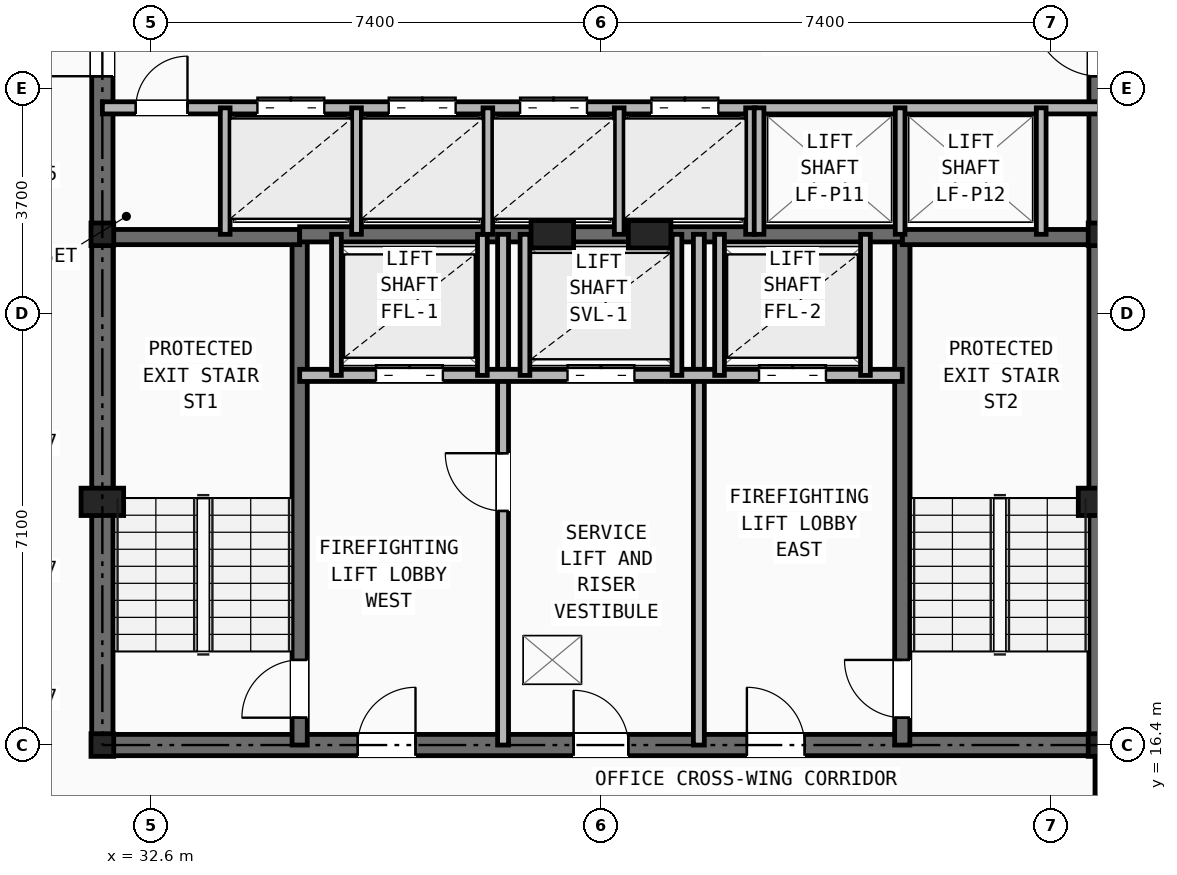
"""IFC4 building model, lengths in metres.
Left out: names, types, materials, properties, quantities, classifications, styles, units other than length and angle.
Written with IfcOpenShell. Run it as: python <this file> out.ifc"""

import sys

from ifc_helpers import new_model, si_unit, direction, frame, frame_2d, origin, origin_2d, place, context, subcontext, project, spatial, rectangle, i_section, extrude, element, fill, save


model = new_model("IFC4")
c1 = context("Model", 3, precision=1e-05, world=origin(), true_north=direction((0.0, 1.0)))
c2 = subcontext(c1, "Body", "Model", "MODEL_VIEW")
j1 = project(units=[si_unit("LENGTHUNIT", "METRE"), si_unit("PLANEANGLEUNIT", "RADIAN")], contexts=[c1])
p1 = place(None, origin())
s1 = spatial("IfcSite", under=j1, at=p1, CompositionType="ELEMENT")
p2 = place(p1, origin())
s2 = spatial("IfcBuilding", under=s1, at=p2, CompositionType="ELEMENT")
p3 = place(p2, frame((0.0, 0.0, 182.7)))
s3 = spatial("IfcBuildingStorey", under=s2, at=p3, CompositionType="ELEMENT", Elevation=182.7)
for number, where, z_axis, x_axis in (
    (1, (31.8, 16.4, 0.0), (0.0, 0.0, 1.0), (1.0, 0.0, 0.0)),
    (2, (48.2, 16.4, 0.0), (0.0, 0.0, 1.0), (1.0, 0.0, 0.0)),
    (3, (31.8, 24.8, 0.0), (0.0, 0.0, 1.0), (1.0, 0.0, 0.0)),
    (4, (48.2, 24.8, 0.0), (0.0, 0.0, 1.0), (1.0, 0.0, 0.0)),
):
    element("IfcColumn", number, at=place(p3, frame(where, z_axis=z_axis, x_axis=x_axis)), inside=s3, PredefinedType="COLUMN", context=c2, shape_type="SweptSolid", body=[
        extrude(i_section(OverallWidth=0.374, OverallDepth=0.372, WebThickness=0.016, FlangeThickness=0.026, at=origin_2d()), origin(), (0.0, 0.0, 1.0), 3.45),
    ])
for number, where, z_axis, x_axis in (
    (5, (31.8, 20.4, 0.0), (0.0, 0.0, 1.0), (1.0, 0.0, 0.0)),
    (6, (48.2, 20.4, 0.0), (0.0, 0.0, 1.0), (1.0, 0.0, 0.0)),
    (7, (39.2, 24.8, 0.0), (0.0, 0.0, 1.0), (1.0, 0.0, 0.0)),
    (8, (40.8, 24.8, 0.0), (0.0, 0.0, 1.0), (1.0, 0.0, 0.0)),
):
    element("IfcColumn", number, at=place(p3, frame(where, z_axis=z_axis, x_axis=x_axis)), inside=s3, PredefinedType="PILASTER", context=c2, shape_type="SweptSolid", body=[
        extrude(rectangle(XDim=0.7, YDim=0.45, at=origin_2d()), origin(), (0.0, 0.0, 1.0), 3.45),
    ])
p4 = place(p3, frame((31.8, 16.4, 0.0), z_axis=(0.0, 0.0, 1.0), x_axis=(1.0, 0.0, 0.0)))
e9 = element("IfcWall", 9, at=p4, inside=s3, PredefinedType="SHEAR", context=c2, shape_type="SweptSolid", body=[
    extrude(rectangle(XDim=16.4, YDim=0.35, at=frame_2d((8.2, 0.0))), origin(), (0.0, 0.0, 1.0), 3.21),
])
p5 = place(p4, frame((7.75, 0.0, 0.0)))
e10 = element("IfcOpeningElement", 10, at=p5, cuts=e9, PredefinedType="OPENING", context=c2, shape_type="SweptSolid", body=[
    extrude(rectangle(XDim=0.9, YDim=2.1, at=frame_2d((0.45, 1.05))), frame((0.0, 0.185, 0.0), z_axis=(0.0, -1.0, 0.0), x_axis=(1.0, 0.0, 0.0)), (0.0, 0.0, 1.0), 0.37),
])
p6 = place(p4, frame((4.2, 0.0, 0.0)))
e11 = element("IfcOpeningElement", 11, at=p6, cuts=e9, PredefinedType="OPENING", context=c2, shape_type="SweptSolid", body=[
    extrude(rectangle(XDim=0.95, YDim=2.1, at=frame_2d((0.475, 1.05))), frame((0.0, 0.185, 0.0), z_axis=(0.0, -1.0, 0.0), x_axis=(1.0, 0.0, 0.0)), (0.0, 0.0, 1.0), 0.37),
])
p7 = place(p4, frame((10.6, 0.0, 0.0)))
e12 = element("IfcOpeningElement", 12, at=p7, cuts=e9, PredefinedType="OPENING", context=c2, shape_type="SweptSolid", body=[
    extrude(rectangle(XDim=0.95, YDim=2.1, at=frame_2d((0.475, 1.05))), frame((0.0, 0.185, 0.0), z_axis=(0.0, -1.0, 0.0), x_axis=(1.0, 0.0, 0.0)), (0.0, 0.0, 1.0), 0.37),
])
p8 = place(p3, frame((31.8, 16.4, 0.0), z_axis=(0.0, 0.0, 1.0), x_axis=(0.0, 1.0, 0.0)))
e13 = element("IfcWall", 13, at=p8, inside=s3, PredefinedType="SHEAR", context=c2, shape_type="SweptSolid", body=[
    extrude(rectangle(XDim=14.8, YDim=0.35, at=frame_2d((7.4, 0.0))), origin(), (0.0, 0.0, 1.0), 3.21),
])
p9 = place(p8, frame((11.0, 0.0, 0.0)))
e14 = element("IfcOpeningElement", 14, at=p9, cuts=e13, PredefinedType="OPENING", context=c2, shape_type="SweptSolid", body=[
    extrude(rectangle(XDim=1.1, YDim=2.15, at=frame_2d((0.55, 1.075))), frame((0.0, 0.185, 0.0), z_axis=(0.0, -1.0, 0.0), x_axis=(1.0, 0.0, 0.0)), (0.0, 0.0, 1.0), 0.37),
])
p10 = place(p3, frame((48.2, 16.4, 0.0), z_axis=(0.0, 0.0, 1.0), x_axis=(0.0, 1.0, 0.0)))
e15 = element("IfcWall", 15, at=p10, inside=s3, PredefinedType="SHEAR", context=c2, shape_type="SweptSolid", body=[
    extrude(rectangle(XDim=14.8, YDim=0.35, at=frame_2d((7.4, 0.0))), origin(), (0.0, 0.0, 1.0), 3.21),
])
p11 = place(p10, frame((11.0, 0.0, 0.0)))
e16 = element("IfcOpeningElement", 16, at=p11, cuts=e15, PredefinedType="OPENING", context=c2, shape_type="SweptSolid", body=[
    extrude(rectangle(XDim=1.1, YDim=2.15, at=frame_2d((0.55, 1.075))), frame((0.0, 0.185, 0.0), z_axis=(0.0, -1.0, 0.0), x_axis=(1.0, 0.0, 0.0)), (0.0, 0.0, 1.0), 0.37),
])
p12 = place(p3, frame((35.045, 16.4, 0.0), z_axis=(0.0, 0.0, 1.0), x_axis=(0.0, 1.0, 0.0)))
e17 = element("IfcWall", 17, at=p12, inside=s3, PredefinedType="SHEAR", context=c2, shape_type="SweptSolid", body=[
    extrude(rectangle(XDim=8.4, YDim=0.25, at=frame_2d((4.2, 0.0))), origin(), (0.0, 0.0, 1.0), 3.21),
])
p13 = place(p12, frame((0.45, 0.0, 0.0)))
e18 = element("IfcOpeningElement", 18, at=p13, cuts=e17, PredefinedType="OPENING", context=c2, shape_type="SweptSolid", body=[
    extrude(rectangle(XDim=0.95, YDim=2.1, at=frame_2d((0.475, 1.05))), frame((0.0, 0.135, 0.0), z_axis=(0.0, -1.0, 0.0), x_axis=(1.0, 0.0, 0.0)), (0.0, 0.0, 1.0), 0.27),
])
p14 = place(p3, frame((31.8, 24.755, 0.0), z_axis=(0.0, 0.0, 1.0), x_axis=(1.0, 0.0, 0.0)))
e19 = element("IfcWall", 19, at=p14, inside=s3, PredefinedType="SHEAR", context=c2, shape_type="SweptSolid", body=[
    extrude(rectangle(XDim=3.245, YDim=0.25, at=frame_2d((1.623, 0.0))), origin(), (0.0, 0.0, 1.0), 3.21),
])
p15 = place(p3, frame((44.955, 16.4, 0.0), z_axis=(0.0, 0.0, 1.0), x_axis=(0.0, 1.0, 0.0)))
e20 = element("IfcWall", 20, at=p15, inside=s3, PredefinedType="SHEAR", context=c2, shape_type="SweptSolid", body=[
    extrude(rectangle(XDim=8.4, YDim=0.25, at=frame_2d((4.2, 0.0))), origin(), (0.0, 0.0, 1.0), 3.21),
])
p16 = place(p15, frame((0.45, 0.0, 0.0)))
e21 = element("IfcOpeningElement", 21, at=p16, cuts=e20, PredefinedType="OPENING", context=c2, shape_type="SweptSolid", body=[
    extrude(rectangle(XDim=0.95, YDim=2.1, at=frame_2d((0.475, 1.05))), frame((0.0, 0.135, 0.0), z_axis=(0.0, -1.0, 0.0), x_axis=(1.0, 0.0, 0.0)), (0.0, 0.0, 1.0), 0.27),
])
p17 = place(p3, frame((44.955, 24.755, 0.0), z_axis=(0.0, 0.0, 1.0), x_axis=(1.0, 0.0, 0.0)))
e22 = element("IfcWall", 22, at=p17, inside=s3, PredefinedType="SHEAR", context=c2, shape_type="SweptSolid", body=[
    extrude(rectangle(XDim=3.245, YDim=0.25, at=frame_2d((1.623, 0.0))), origin(), (0.0, 0.0, 1.0), 3.21),
])
p18 = place(p3, frame((35.045, 24.8, 0.0), z_axis=(0.0, 0.0, 1.0), x_axis=(1.0, 0.0, 0.0)))
e23 = element("IfcWall", 23, at=p18, inside=s3, PredefinedType="SHEAR", context=c2, shape_type="SweptSolid", body=[
    extrude(rectangle(XDim=9.91, YDim=0.25, at=frame_2d((4.955, 0.0))), origin(), (0.0, 0.0, 1.0), 3.21),
])
p19 = place(p3, frame((38.39, 16.4, 0.0), z_axis=(0.0, 0.0, 1.0), x_axis=(0.0, 1.0, 0.0)))
e24 = element("IfcWall", 24, at=p19, inside=s3, PredefinedType="PARTITIONING", context=c2, shape_type="SweptSolid", body=[
    extrude(rectangle(XDim=8.4, YDim=0.18, at=frame_2d((4.2, 0.0))), origin(), (0.0, 0.0, 1.0), 2.665),
])
p20 = place(p19, frame((3.85, 0.0, 0.0)))
e25 = element("IfcOpeningElement", 25, at=p20, cuts=e24, PredefinedType="OPENING", context=c2, shape_type="SweptSolid", body=[
    extrude(rectangle(XDim=0.95, YDim=2.1, at=frame_2d((0.475, 1.05))), frame((0.0, 0.1, 0.0), z_axis=(0.0, -1.0, 0.0), x_axis=(1.0, 0.0, 0.0)), (0.0, 0.0, 1.0), 0.2),
])
p21 = place(p3, frame((41.61, 16.4, 0.0), z_axis=(0.0, 0.0, 1.0), x_axis=(0.0, 1.0, 0.0)))
e26 = element("IfcWall", 26, at=p21, inside=s3, PredefinedType="PARTITIONING", context=c2, shape_type="SweptSolid", body=[
    extrude(rectangle(XDim=8.4, YDim=0.18, at=frame_2d((4.2, 0.0))), origin(), (0.0, 0.0, 1.0), 2.665),
])
p22 = place(p3, frame((35.045, 22.48, 0.0), z_axis=(0.0, 0.0, 1.0), x_axis=(1.0, 0.0, 0.0)))
e27 = element("IfcWall", 27, at=p22, inside=s3, PredefinedType="SOLIDWALL", context=c2, shape_type="SweptSolid", body=[
    extrude(rectangle(XDim=9.91, YDim=0.2, at=frame_2d((4.955, 0.0))), origin(), (0.0, 0.0, 1.0), 3.21),
])
p23 = place(p22, frame((1.255, 0.0, 0.0)))
e28 = element("IfcOpeningElement", 28, at=p23, cuts=e27, PredefinedType="OPENING", context=c2, shape_type="SweptSolid", body=[
    extrude(rectangle(XDim=1.1, YDim=2.15, at=frame_2d((0.55, 1.075))), frame((0.0, 0.11, 0.0), z_axis=(0.0, -1.0, 0.0), x_axis=(1.0, 0.0, 0.0)), (0.0, 0.0, 1.0), 0.22),
])
p24 = place(p22, frame((7.555, 0.0, 0.0)))
e29 = element("IfcOpeningElement", 29, at=p24, cuts=e27, PredefinedType="OPENING", context=c2, shape_type="SweptSolid", body=[
    extrude(rectangle(XDim=1.1, YDim=2.15, at=frame_2d((0.55, 1.075))), frame((0.0, 0.11, 0.0), z_axis=(0.0, -1.0, 0.0), x_axis=(1.0, 0.0, 0.0)), (0.0, 0.0, 1.0), 0.22),
])
p25 = place(p22, frame((4.405, 0.0, 0.0)))
e30 = element("IfcOpeningElement", 30, at=p25, cuts=e27, PredefinedType="OPENING", context=c2, shape_type="SweptSolid", body=[
    extrude(rectangle(XDim=1.1, YDim=2.15, at=frame_2d((0.55, 1.075))), frame((0.0, 0.11, 0.0), z_axis=(0.0, -1.0, 0.0), x_axis=(1.0, 0.0, 0.0)), (0.0, 0.0, 1.0), 0.22),
])
for number, where, z_axis, x_axis in (
    (31, (35.65, 22.48, 0.0), (0.0, 0.0, 1.0), (0.0, 1.0, 0.0)),
    (32, (38.05, 22.48, 0.0), (0.0, 0.0, 1.0), (0.0, 1.0, 0.0)),
    (33, (41.95, 22.48, 0.0), (0.0, 0.0, 1.0), (0.0, 1.0, 0.0)),
    (34, (44.35, 22.48, 0.0), (0.0, 0.0, 1.0), (0.0, 1.0, 0.0)),
    (35, (38.75, 22.48, 0.0), (0.0, 0.0, 1.0), (0.0, 1.0, 0.0)),
    (36, (41.25, 22.48, 0.0), (0.0, 0.0, 1.0), (0.0, 1.0, 0.0)),
):
    element("IfcWall", number, at=place(p3, frame(where, z_axis=z_axis, x_axis=x_axis)), inside=s3, PredefinedType="SOLIDWALL", context=c2, shape_type="SweptSolid", body=[
        extrude(rectangle(XDim=2.32, YDim=0.16, at=frame_2d((1.16, 0.0))), origin(), (0.0, 0.0, 1.0), 3.21),
    ])
p26 = place(p3, frame((31.8, 26.88, 0.0), z_axis=(0.0, 0.0, 1.0), x_axis=(1.0, 0.0, 0.0)))
e37 = element("IfcWall", 37, at=p26, inside=s3, PredefinedType="SOLIDWALL", context=c2, shape_type="SweptSolid", body=[
    extrude(rectangle(XDim=16.4, YDim=0.2, at=frame_2d((8.2, 0.0))), origin(), (0.0, 0.0, 1.0), 2.665),
])
p27 = place(p26, frame((0.55, 0.0, 0.0)))
e38 = element("IfcOpeningElement", 38, at=p27, cuts=e37, PredefinedType="OPENING", context=c2, shape_type="SweptSolid", body=[
    extrude(rectangle(XDim=0.85, YDim=2.05, at=frame_2d((0.425, 1.025))), frame((0.0, 0.11, 0.0), z_axis=(0.0, -1.0, 0.0), x_axis=(1.0, 0.0, 0.0)), (0.0, 0.0, 1.0), 0.22),
])
p28 = place(p26, frame((2.55, 0.0, 0.0)))
e39 = element("IfcOpeningElement", 39, at=p28, cuts=e37, PredefinedType="OPENING", context=c2, shape_type="SweptSolid", body=[
    extrude(rectangle(XDim=1.1, YDim=2.15, at=frame_2d((0.55, 1.075))), frame((0.0, 0.11, 0.0), z_axis=(0.0, -1.0, 0.0), x_axis=(1.0, 0.0, 0.0)), (0.0, 0.0, 1.0), 0.22),
])
p29 = place(p26, frame((4.71, 0.0, 0.0)))
e40 = element("IfcOpeningElement", 40, at=p29, cuts=e37, PredefinedType="OPENING", context=c2, shape_type="SweptSolid", body=[
    extrude(rectangle(XDim=1.1, YDim=2.15, at=frame_2d((0.55, 1.075))), frame((0.0, 0.11, 0.0), z_axis=(0.0, -1.0, 0.0), x_axis=(1.0, 0.0, 0.0)), (0.0, 0.0, 1.0), 0.22),
])
p30 = place(p26, frame((6.87, 0.0, 0.0)))
e41 = element("IfcOpeningElement", 41, at=p30, cuts=e37, PredefinedType="OPENING", context=c2, shape_type="SweptSolid", body=[
    extrude(rectangle(XDim=1.1, YDim=2.15, at=frame_2d((0.55, 1.075))), frame((0.0, 0.11, 0.0), z_axis=(0.0, -1.0, 0.0), x_axis=(1.0, 0.0, 0.0)), (0.0, 0.0, 1.0), 0.22),
])
p31 = place(p26, frame((9.03, 0.0, 0.0)))
e42 = element("IfcOpeningElement", 42, at=p31, cuts=e37, PredefinedType="OPENING", context=c2, shape_type="SweptSolid", body=[
    extrude(rectangle(XDim=1.1, YDim=2.15, at=frame_2d((0.55, 1.075))), frame((0.0, 0.11, 0.0), z_axis=(0.0, -1.0, 0.0), x_axis=(1.0, 0.0, 0.0)), (0.0, 0.0, 1.0), 0.22),
])
for number, where, z_axis, x_axis in (
    (43, (33.82, 24.8, 0.0), (0.0, 0.0, 1.0), (0.0, 1.0, 0.0)),
    (44, (35.98, 24.8, 0.0), (0.0, 0.0, 1.0), (0.0, 1.0, 0.0)),
    (45, (38.14, 24.8, 0.0), (0.0, 0.0, 1.0), (0.0, 1.0, 0.0)),
    (46, (40.3, 24.8, 0.0), (0.0, 0.0, 1.0), (0.0, 1.0, 0.0)),
    (47, (42.46, 24.8, 0.0), (0.0, 0.0, 1.0), (0.0, 1.0, 0.0)),
    (48, (42.6, 24.8, 0.0), (0.0, 0.0, 1.0), (0.0, 1.0, 0.0)),
    (49, (44.92, 24.8, 0.0), (0.0, 0.0, 1.0), (0.0, 1.0, 0.0)),
    (50, (47.24, 24.8, 0.0), (0.0, 0.0, 1.0), (0.0, 1.0, 0.0)),
):
    element("IfcWall", number, at=place(p3, frame(where, z_axis=z_axis, x_axis=x_axis)), inside=s3, PredefinedType="SOLIDWALL", context=c2, shape_type="SweptSolid", body=[
        extrude(rectangle(XDim=2.08, YDim=0.16, at=frame_2d((1.04, 0.0))), origin(), (0.0, 0.0, 1.0), 3.21),
    ])
p32 = place(p3, frame((48.2, 14.1, 0.0), z_axis=(0.0, 0.0, 1.0), x_axis=(0.0, 1.0, 0.0)))
e51 = element("IfcWall", 51, at=p32, inside=s3, PredefinedType="PARTITIONING", context=c2, shape_type="SweptSolid", body=[
    extrude(rectangle(XDim=2.3, YDim=0.15, at=frame_2d((1.15, 0.0))), origin(), (0.0, 0.0, 1.0), 2.665),
])
p33 = place(p5, origin())
e52 = element("IfcDoor", 52, at=p33, inside=s3, OperationType="SINGLE_SWING_LEFT", PredefinedType="DOOR", context=c2, shape_type="SweptSolid", body=[
    extrude(rectangle(XDim=0.9, YDim=2.1, at=frame_2d((0.45, 1.05))), frame((0.0, 0.025, 0.0), z_axis=(0.0, -1.0, 0.0), x_axis=(1.0, 0.0, 0.0)), (0.0, 0.0, 1.0), 0.05),
])
fill(e10, e52)
p34 = place(p20, origin())
e53 = element("IfcDoor", 53, at=p34, inside=s3, OperationType="SINGLE_SWING_RIGHT", PredefinedType="DOOR", context=c2, shape_type="SweptSolid", body=[
    extrude(rectangle(XDim=0.95, YDim=2.1, at=frame_2d((0.475, 1.05))), frame((0.0, 0.025, 0.0), z_axis=(0.0, -1.0, 0.0), x_axis=(1.0, 0.0, 0.0)), (0.0, 0.0, 1.0), 0.05),
])
fill(e25, e53)
p35 = place(p13, origin())
e54 = element("IfcDoor", 54, at=p35, inside=s3, OperationType="SINGLE_SWING_LEFT", PredefinedType="DOOR", context=c2, shape_type="SweptSolid", body=[
    extrude(rectangle(XDim=0.95, YDim=2.1, at=frame_2d((0.475, 1.05))), frame((0.0, 0.025, 0.0), z_axis=(0.0, -1.0, 0.0), x_axis=(1.0, 0.0, 0.0)), (0.0, 0.0, 1.0), 0.05),
])
fill(e18, e54)
p36 = place(p16, origin())
e55 = element("IfcDoor", 55, at=p36, inside=s3, OperationType="SINGLE_SWING_RIGHT", PredefinedType="DOOR", context=c2, shape_type="SweptSolid", body=[
    extrude(rectangle(XDim=0.95, YDim=2.1, at=frame_2d((0.475, 1.05))), frame((0.0, 0.025, 0.0), z_axis=(0.0, -1.0, 0.0), x_axis=(1.0, 0.0, 0.0)), (0.0, 0.0, 1.0), 0.05),
])
fill(e21, e55)
p37 = place(p6, origin())
e56 = element("IfcDoor", 56, at=p37, inside=s3, OperationType="SINGLE_SWING_RIGHT", PredefinedType="DOOR", context=c2, shape_type="SweptSolid", body=[
    extrude(rectangle(XDim=0.95, YDim=2.1, at=frame_2d((0.475, 1.05))), frame((0.0, 0.025, 0.0), z_axis=(0.0, -1.0, 0.0), x_axis=(1.0, 0.0, 0.0)), (0.0, 0.0, 1.0), 0.05),
])
fill(e11, e56)
p38 = place(p7, origin())
e57 = element("IfcDoor", 57, at=p38, inside=s3, OperationType="SINGLE_SWING_LEFT", PredefinedType="DOOR", context=c2, shape_type="SweptSolid", body=[
    extrude(rectangle(XDim=0.95, YDim=2.1, at=frame_2d((0.475, 1.05))), frame((0.0, 0.025, 0.0), z_axis=(0.0, -1.0, 0.0), x_axis=(1.0, 0.0, 0.0)), (0.0, 0.0, 1.0), 0.05),
])
fill(e12, e57)
p39 = place(p23, origin())
e58 = element("IfcDoor", 58, at=p39, inside=s3, OperationType="DOUBLE_DOOR_SLIDING", PredefinedType="DOOR", context=c2, shape_type="SweptSolid", body=[
    extrude(rectangle(XDim=1.1, YDim=2.15, at=frame_2d((0.55, 1.075))), frame((0.0, 0.025, 0.0), z_axis=(0.0, -1.0, 0.0), x_axis=(1.0, 0.0, 0.0)), (0.0, 0.0, 1.0), 0.05),
])
fill(e28, e58)
p40 = place(p24, origin())
e59 = element("IfcDoor", 59, at=p40, inside=s3, OperationType="DOUBLE_DOOR_SLIDING", PredefinedType="DOOR", context=c2, shape_type="SweptSolid", body=[
    extrude(rectangle(XDim=1.1, YDim=2.15, at=frame_2d((0.55, 1.075))), frame((0.0, 0.025, 0.0), z_axis=(0.0, -1.0, 0.0), x_axis=(1.0, 0.0, 0.0)), (0.0, 0.0, 1.0), 0.05),
])
fill(e29, e59)
p41 = place(p25, origin())
e60 = element("IfcDoor", 60, at=p41, inside=s3, OperationType="DOUBLE_DOOR_SLIDING", PredefinedType="DOOR", context=c2, shape_type="SweptSolid", body=[
    extrude(rectangle(XDim=1.1, YDim=2.15, at=frame_2d((0.55, 1.075))), frame((0.0, 0.025, 0.0), z_axis=(0.0, -1.0, 0.0), x_axis=(1.0, 0.0, 0.0)), (0.0, 0.0, 1.0), 0.05),
])
fill(e30, e60)
p42 = place(p27, origin())
e61 = element("IfcDoor", 61, at=p42, inside=s3, OperationType="SINGLE_SWING_RIGHT", PredefinedType="DOOR", context=c2, shape_type="SweptSolid", body=[
    extrude(rectangle(XDim=0.85, YDim=2.05, at=frame_2d((0.425, 1.025))), frame((0.0, 0.025, 0.0), z_axis=(0.0, -1.0, 0.0), x_axis=(1.0, 0.0, 0.0)), (0.0, 0.0, 1.0), 0.05),
])
fill(e38, e61)
p43 = place(p9, origin())
e62 = element("IfcDoor", 62, at=p43, inside=s3, OperationType="SINGLE_SWING_LEFT", PredefinedType="DOOR", context=c2, shape_type="SweptSolid", body=[
    extrude(rectangle(XDim=1.1, YDim=2.15, at=frame_2d((0.55, 1.075))), frame((0.0, 0.025, 0.0), z_axis=(0.0, -1.0, 0.0), x_axis=(1.0, 0.0, 0.0)), (0.0, 0.0, 1.0), 0.05),
])
fill(e14, e62)
p44 = place(p28, origin())
e63 = element("IfcDoor", 63, at=p44, inside=s3, OperationType="DOUBLE_DOOR_SLIDING", PredefinedType="DOOR", context=c2, shape_type="SweptSolid", body=[
    extrude(rectangle(XDim=1.1, YDim=2.15, at=frame_2d((0.55, 1.075))), frame((0.0, 0.025, 0.0), z_axis=(0.0, -1.0, 0.0), x_axis=(1.0, 0.0, 0.0)), (0.0, 0.0, 1.0), 0.05),
])
fill(e39, e63)
p45 = place(p29, origin())
e64 = element("IfcDoor", 64, at=p45, inside=s3, OperationType="DOUBLE_DOOR_SLIDING", PredefinedType="DOOR", context=c2, shape_type="SweptSolid", body=[
    extrude(rectangle(XDim=1.1, YDim=2.15, at=frame_2d((0.55, 1.075))), frame((0.0, 0.025, 0.0), z_axis=(0.0, -1.0, 0.0), x_axis=(1.0, 0.0, 0.0)), (0.0, 0.0, 1.0), 0.05),
])
fill(e40, e64)
p46 = place(p30, origin())
e65 = element("IfcDoor", 65, at=p46, inside=s3, OperationType="DOUBLE_DOOR_SLIDING", PredefinedType="DOOR", context=c2, shape_type="SweptSolid", body=[
    extrude(rectangle(XDim=1.1, YDim=2.15, at=frame_2d((0.55, 1.075))), frame((0.0, 0.025, 0.0), z_axis=(0.0, -1.0, 0.0), x_axis=(1.0, 0.0, 0.0)), (0.0, 0.0, 1.0), 0.05),
])
fill(e41, e65)
p47 = place(p31, origin())
e66 = element("IfcDoor", 66, at=p47, inside=s3, OperationType="DOUBLE_DOOR_SLIDING", PredefinedType="DOOR", context=c2, shape_type="SweptSolid", body=[
    extrude(rectangle(XDim=1.1, YDim=2.15, at=frame_2d((0.55, 1.075))), frame((0.0, 0.025, 0.0), z_axis=(0.0, -1.0, 0.0), x_axis=(1.0, 0.0, 0.0)), (0.0, 0.0, 1.0), 0.05),
])
fill(e42, e66)
save(model, sys.argv[1])
